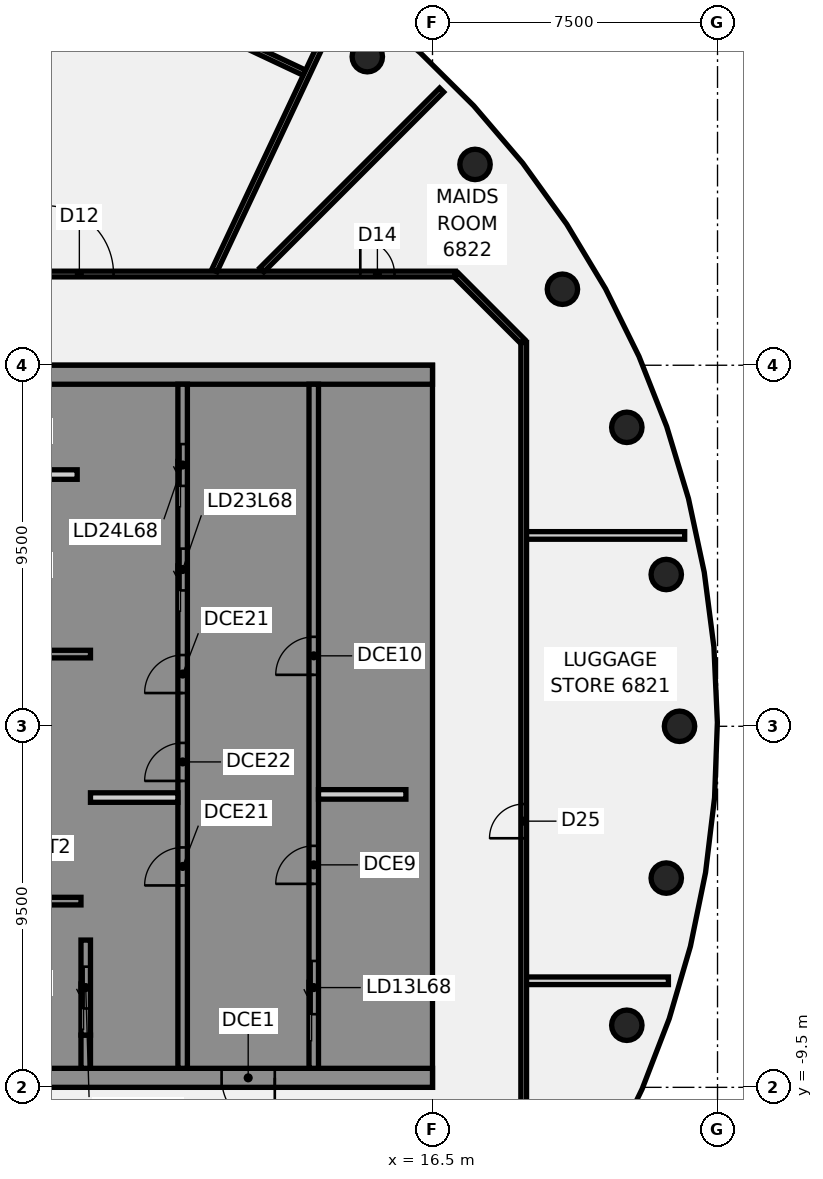
"""IFC4 building model, lengths in metres.
Left out: names, types, materials, properties, quantities, classifications, styles, units other than length and angle.
Written with IfcOpenShell. Run it as: python <this file> out.ifc"""

import sys

from ifc_helpers import new_model, si_unit, direction, frame, frame_2d, origin, origin_2d, place, context, subcontext, project, spatial, polyline, rectangle, circle, outline, extrude, element, fill, save


model = new_model("IFC4")
c1 = context("Model", 3, precision=1e-05, world=origin(), true_north=direction((0.0, 1.0)))
c2 = subcontext(c1, "Body", "Model", "MODEL_VIEW")
j1 = project(units=[si_unit("LENGTHUNIT", "METRE"), si_unit("PLANEANGLEUNIT", "RADIAN")], contexts=[c1])
p1 = place(None, origin())
s1 = spatial("IfcSite", under=j1, at=p1, CompositionType="ELEMENT")
p2 = place(p1, origin())
s2 = spatial("IfcBuilding", under=s1, at=p2, CompositionType="ELEMENT")
p3 = place(p2, frame((0.0, 0.0, 267.6)))
s3 = spatial("IfcBuildingStorey", under=s2, at=p3, CompositionType="ELEMENT", Elevation=267.6)
for number, where, z_axis, x_axis in (
    (1, (23.0, 0.0, -0.14), (0.0, 0.0, 1.0), (1.0, 0.0, 0.0)),
    (2, (22.651, 3.994, -0.14), (0.0, 0.0, 1.0), (1.0, 0.0, 0.0)),
    (3, (21.613, 7.866, -0.14), (0.0, 0.0, 1.0), (1.0, 0.0, 0.0)),
    (4, (19.919, 11.5, -0.14), (0.0, 0.0, 1.0), (1.0, 0.0, 0.0)),
    (5, (17.619, 14.784, -0.14), (0.0, 0.0, 1.0), (1.0, 0.0, 0.0)),
    (6, (14.784, 17.619, -0.14), (0.0, 0.0, 1.0), (1.0, 0.0, 0.0)),
    (7, (21.613, -7.866, -0.14), (0.0, 0.0, 1.0), (1.0, 0.0, 0.0)),
    (8, (22.651, -3.994, -0.14), (0.0, 0.0, 1.0), (1.0, 0.0, 0.0)),
):
    element("IfcColumn", number, at=place(p3, frame(where, z_axis=z_axis, x_axis=x_axis)), inside=s3, PredefinedType="COLUMN", context=c2, shape_type="SweptSolid", body=[
        extrude(circle(Radius=0.4, at=origin_2d()), origin(), (0.0, 0.0, 1.0), 3.6),
    ])
p4 = place(p3, frame((17.128, 11.872, 0.0), z_axis=(0.0, 0.0, 1.0), x_axis=(0.707106781187, -0.707106781187, 0.0)))
e9 = element("IfcWall", 9, at=p4, inside=s3, PredefinedType="PARTITIONING", context=c2, shape_type="SweptSolid", body=[
    extrude(rectangle(XDim=2.465, YDim=0.15, at=frame_2d((1.232, 0.0))), origin(), (0.0, 0.0, 1.0), 2.864),
])
p5 = place(p3, frame((0.337, 23.223, 0.0), z_axis=(0.0, 0.0, 1.0), x_axis=(0.904661349285, -0.426131251036, 0.0)))
e10 = element("IfcWall", 10, at=p5, inside=s3, PredefinedType="PARTITIONING", context=c2, shape_type="SweptSolid", body=[
    extrude(rectangle(XDim=14.141, YDim=0.15, at=frame_2d((7.07, 0.0))), origin(), (0.0, 0.0, 1.0), 2.864),
])
p6 = place(p5, frame((4.35, 0.0, 0.0)))
e11 = element("IfcOpeningElement", 11, at=p6, cuts=e10, PredefinedType="OPENING", context=c2, shape_type="SweptSolid", body=[
    extrude(rectangle(XDim=1.8, YDim=2.1, at=frame_2d((0.9, 1.05))), frame((0.0, 0.085, 0.0), z_axis=(0.0, -1.0, 0.0), x_axis=(1.0, 0.0, 0.0)), (0.0, 0.0, 1.0), 0.17),
])
p7 = place(p3, frame((-17.065, 11.9, 0.0), z_axis=(0.0, 0.0, 1.0), x_axis=(1.0, 0.0, 0.0)))
e12 = element("IfcWall", 12, at=p7, inside=s3, PredefinedType="PARTITIONING", context=c2, shape_type="SweptSolid", body=[
    extrude(rectangle(XDim=34.165, YDim=0.15, at=frame_2d((17.083, 0.0))), origin(), (0.0, 0.0, 1.0), 2.864),
])
p8 = place(p7, frame((23.372, 0.0, 0.0)))
e13 = element("IfcOpeningElement", 13, at=p8, cuts=e12, PredefinedType="OPENING", context=c2, shape_type="SweptSolid", body=[
    extrude(rectangle(XDim=1.8, YDim=2.1, at=frame_2d((0.9, 1.05))), frame((0.0, 0.085, 0.0), z_axis=(0.0, -1.0, 0.0), x_axis=(1.0, 0.0, 0.0)), (0.0, 0.0, 1.0), 0.17),
])
p9 = place(p7, frame((1.615, 0.0, 0.0)))
e14 = element("IfcOpeningElement", 14, at=p9, cuts=e12, PredefinedType="OPENING", context=c2, shape_type="SweptSolid", body=[
    extrude(rectangle(XDim=0.9, YDim=2.1, at=frame_2d((0.45, 1.05))), frame((0.0, 0.085, 0.0), z_axis=(0.0, -1.0, 0.0), x_axis=(1.0, 0.0, 0.0)), (0.0, 0.0, 1.0), 0.17),
])
p10 = place(p7, frame((31.665, 0.0, 0.0)))
e15 = element("IfcOpeningElement", 15, at=p10, cuts=e12, PredefinedType="OPENING", context=c2, shape_type="SweptSolid", body=[
    extrude(rectangle(XDim=0.9, YDim=2.1, at=frame_2d((0.45, 1.05))), frame((0.0, 0.085, 0.0), z_axis=(0.0, -1.0, 0.0), x_axis=(1.0, 0.0, 0.0)), (0.0, 0.0, 1.0), 0.17),
])
p11 = place(p7, frame((12.065, 0.0, 0.0)))
e16 = element("IfcOpeningElement", 16, at=p11, cuts=e12, PredefinedType="OPENING", context=c2, shape_type="SweptSolid", body=[
    extrude(rectangle(XDim=1.8, YDim=2.1, at=frame_2d((0.9, 1.05))), frame((0.0, 0.085, 0.0), z_axis=(0.0, -1.0, 0.0), x_axis=(1.0, 0.0, 0.0)), (0.0, 0.0, 1.0), 0.17),
])
p12 = place(p3, frame((18.955, -6.696, 0.0), z_axis=(0.0, 0.0, 1.0), x_axis=(1.0, 0.0, 0.0)))
e17 = element("IfcWall", 17, at=p12, inside=s3, PredefinedType="PARTITIONING", context=c2, shape_type="SweptSolid", body=[
    extrude(rectangle(XDim=3.753, YDim=0.2, at=frame_2d((1.876, 0.0))), origin(), (0.0, 0.0, 1.0), 2.864),
])
p13 = place(p3, frame((18.955, 5.022, 0.0), z_axis=(0.0, 0.0, 1.0), x_axis=(1.0, 0.0, 0.0)))
e18 = element("IfcWall", 18, at=p13, inside=s3, PredefinedType="PARTITIONING", context=c2, shape_type="SweptSolid", body=[
    extrude(rectangle(XDim=4.181, YDim=0.2, at=frame_2d((2.09, 0.0))), origin(), (0.0, 0.0, 1.0), 2.864),
])
p14 = place(p3, frame((12.01, 12.01, 0.0), z_axis=(0.0, 0.0, 1.0), x_axis=(0.707106781187, 0.707106781187, 0.0)))
e19 = element("IfcWall", 19, at=p14, inside=s3, PredefinedType="PARTITIONING", context=c2, shape_type="SweptSolid", body=[
    extrude(rectangle(XDim=6.691, YDim=0.15, at=frame_2d((3.345, 0.0))), origin(), (0.0, 0.0, 1.0), 2.864),
])
p15 = place(p3, frame((10.76, 11.99, 0.0), z_axis=(0.0, 0.0, 1.0), x_axis=(0.426145612642, 0.904654584262, 0.0)))
e20 = element("IfcWall", 20, at=p15, inside=s3, PredefinedType="PARTITIONING", context=c2, shape_type="SweptSolid", body=[
    extrude(rectangle(XDim=7.791, YDim=0.15, at=frame_2d((3.896, 0.0))), origin(), (0.0, 0.0, 1.0), 2.864),
])
p16 = place(p3, frame((18.9, -10.1, 0.0), z_axis=(0.0, 0.0, 1.0), x_axis=(0.0, 1.0, 0.0)))
e21 = element("IfcWall", 21, at=p16, inside=s3, PredefinedType="PARTITIONING", context=c2, shape_type="SweptSolid", body=[
    extrude(rectangle(XDim=20.2, YDim=0.15, at=frame_2d((10.1, 0.0))), origin(), (0.0, 0.0, 1.0), 2.864),
])
p17 = place(p16, frame((7.154, 0.0, 0.0)))
e22 = element("IfcOpeningElement", 22, at=p17, cuts=e21, PredefinedType="OPENING", context=c2, shape_type="SweptSolid", body=[
    extrude(rectangle(XDim=0.9, YDim=2.1, at=frame_2d((0.45, 1.05))), frame((0.0, 0.085, 0.0), z_axis=(0.0, -1.0, 0.0), x_axis=(1.0, 0.0, 0.0)), (0.0, 0.0, 1.0), 0.17),
])
p18 = place(p3, frame((16.5, -9.25, 0.0), z_axis=(0.0, 0.0, 1.0), x_axis=(-1.0, 0.0, 0.0)))
e23 = element("IfcWall", 23, at=p18, inside=s3, PredefinedType="SHEAR", context=c2, shape_type="SweptSolid", body=[
    extrude(rectangle(XDim=13.0, YDim=0.5, at=frame_2d((6.5, 0.0))), origin(), (0.0, 0.0, 1.0), 3.46),
])
p19 = place(p18, frame((4.15, 0.0, 0.0)))
e24 = element("IfcOpeningElement", 24, at=p19, cuts=e23, PredefinedType="OPENING", context=c2, shape_type="SweptSolid", body=[
    extrude(rectangle(XDim=1.4, YDim=2.1, at=frame_2d((0.7, 1.05))), frame((0.0, 0.26, 0.0), z_axis=(0.0, -1.0, 0.0), x_axis=(1.0, 0.0, 0.0)), (0.0, 0.0, 1.0), 0.52),
])
p20 = place(p18, frame((10.125, 0.0, 0.0)))
e25 = element("IfcOpeningElement", 25, at=p20, cuts=e23, PredefinedType="OPENING", context=c2, shape_type="SweptSolid", body=[
    extrude(rectangle(XDim=1.4, YDim=2.1, at=frame_2d((0.7, 1.05))), frame((0.0, 0.26, 0.0), z_axis=(0.0, -1.0, 0.0), x_axis=(1.0, 0.0, 0.0)), (0.0, 0.0, 1.0), 0.52),
])
p21 = place(p3, origin())
e26 = element("IfcWall", 26, at=p21, inside=s3, PredefinedType="SHEAR", context=c2, shape_type="SweptSolid", body=[
    extrude(outline(polyline([(13.5, -8.125), (13.5, -9.0), (16.0, -9.0), (16.5, -9.0), (16.5, 9.0), (16.0, 9.0), (13.5, 9.0), (13.5, 8.125), (16.0, 8.125), (16.0, 5.625), (13.5, 5.625), (13.5, 5.375), (16.0, 5.375), (16.0, -5.375), (13.5, -5.375), (13.5, -5.625), (16.0, -5.625), (16.0, -8.125), (13.5, -8.125)])), origin(), (0.0, 0.0, 1.0), 3.46),
])
p22 = place(p3, frame((16.5, 9.25, 0.0), z_axis=(0.0, 0.0, 1.0), x_axis=(-1.0, 0.0, 0.0)))
e27 = element("IfcWall", 27, at=p22, inside=s3, PredefinedType="SHEAR", context=c2, shape_type="SweptSolid", body=[
    extrude(rectangle(XDim=13.0, YDim=0.5, at=frame_2d((6.5, 0.0))), origin(), (0.0, 0.0, 1.0), 3.46),
])
p23 = place(p3, origin())
e28 = element("IfcWall", 28, at=p23, inside=s3, PredefinedType="SHEAR", context=c2, shape_type="SweptSolid", body=[
    extrude(outline(polyline([(9.8, -5.375), (7.5, -5.375), (7.5, 2.625), (9.8, 2.625), (9.8, 2.875), (7.5, 2.875), (7.5, 5.375), (9.8, 5.375), (9.8, 5.625), (7.5, 5.625), (7.5, 8.125), (9.8, 8.125), (9.8, 9.0), (7.5, 9.0), (7.25, 9.0), (7.25, -5.625), (7.5, -5.625), (9.8, -5.625), (9.8, -5.375)])), origin(), (0.0, 0.0, 1.0), 3.46),
])
p24 = place(p3, origin())
e29 = element("IfcWall", 29, at=p24, inside=s3, PredefinedType="SHEAR", context=c2, shape_type="SweptSolid", body=[
    extrude(outline(polyline([(7.5, -8.125), (7.5, -9.0), (9.8, -9.0), (9.8, -8.125), (9.8, -5.625), (9.55, -5.625), (9.55, -8.125), (7.5, -8.125)])), origin(), (0.0, 0.0, 1.0), 3.46),
])
p25 = place(p3, frame((7.375, -9.0, 0.0), z_axis=(0.0, 0.0, 1.0), x_axis=(0.0, 1.0, 0.0)))
e30 = element("IfcWall", 30, at=p25, inside=s3, PredefinedType="SHEAR", context=c2, shape_type="SweptSolid", body=[
    extrude(rectangle(XDim=0.875, YDim=0.25, at=frame_2d((0.438, 0.0))), origin(), (0.0, 0.0, 1.0), 3.46),
])
p26 = place(p3, frame((7.5, 1.9, 0.0), z_axis=(0.0, 0.0, 1.0), x_axis=(-1.0, 0.0, 0.0)))
e31 = element("IfcWall", 31, at=p26, inside=s3, PredefinedType="SHEAR", context=c2, shape_type="SweptSolid", body=[
    extrude(rectangle(XDim=3.3, YDim=0.2, at=frame_2d((1.65, 0.0))), origin(), (0.0, 0.0, 1.0), 3.46),
])
p27 = place(p3, frame((13.375, -9.0, 0.0), z_axis=(0.0, 0.0, 1.0), x_axis=(0.0, 1.0, 0.0)))
e32 = element("IfcWall", 32, at=p27, inside=s3, PredefinedType="SHEAR", context=c2, shape_type="SweptSolid", body=[
    extrude(rectangle(XDim=18.0, YDim=0.25, at=frame_2d((9.0, 0.0))), origin(), (0.0, 0.0, 1.0), 3.46),
])
p28 = place(p27, frame((1.425, 0.0, 0.0)))
e33 = element("IfcOpeningElement", 33, at=p28, cuts=e32, PredefinedType="OPENING", context=c2, shape_type="SweptSolid", body=[
    extrude(rectangle(XDim=1.4, YDim=2.1, at=frame_2d((0.7, 1.05))), frame((0.0, 0.135, 0.0), z_axis=(0.0, -1.0, 0.0), x_axis=(1.0, 0.0, 0.0)), (0.0, 0.0, 1.0), 0.27),
])
p29 = place(p27, frame((4.854, 0.0, 0.0)))
e34 = element("IfcOpeningElement", 34, at=p29, cuts=e32, PredefinedType="OPENING", context=c2, shape_type="SweptSolid", body=[
    extrude(rectangle(XDim=1.0, YDim=2.1, at=frame_2d((0.5, 1.05))), frame((0.0, 0.135, 0.0), z_axis=(0.0, -1.0, 0.0), x_axis=(1.0, 0.0, 0.0)), (0.0, 0.0, 1.0), 0.27),
])
p30 = place(p27, frame((10.354, 0.0, 0.0)))
e35 = element("IfcOpeningElement", 35, at=p30, cuts=e32, PredefinedType="OPENING", context=c2, shape_type="SweptSolid", body=[
    extrude(rectangle(XDim=1.0, YDim=2.1, at=frame_2d((0.5, 1.05))), frame((0.0, 0.135, 0.0), z_axis=(0.0, -1.0, 0.0), x_axis=(1.0, 0.0, 0.0)), (0.0, 0.0, 1.0), 0.27),
])
p31 = place(p3, frame((9.925, -9.0, 0.0), z_axis=(0.0, 0.0, 1.0), x_axis=(0.0, 1.0, 0.0)))
e36 = element("IfcWall", 36, at=p31, inside=s3, PredefinedType="SHEAR", context=c2, shape_type="SweptSolid", body=[
    extrude(rectangle(XDim=18.0, YDim=0.25, at=frame_2d((9.0, 0.0))), origin(), (0.0, 0.0, 1.0), 3.46),
])
p32 = place(p31, frame((12.575, 0.0, 0.0)))
e37 = element("IfcOpeningElement", 37, at=p32, cuts=e36, PredefinedType="OPENING", context=c2, shape_type="SweptSolid", body=[
    extrude(rectangle(XDim=1.1, YDim=2.1, at=frame_2d((0.55, 1.05))), frame((0.0, 0.135, 0.0), z_axis=(0.0, -1.0, 0.0), x_axis=(1.0, 0.0, 0.0)), (0.0, 0.0, 1.0), 0.27),
])
p33 = place(p31, frame((15.325, 0.0, 0.0)))
e38 = element("IfcOpeningElement", 38, at=p33, cuts=e36, PredefinedType="OPENING", context=c2, shape_type="SweptSolid", body=[
    extrude(rectangle(XDim=1.1, YDim=2.1, at=frame_2d((0.55, 1.05))), frame((0.0, 0.135, 0.0), z_axis=(0.0, -1.0, 0.0), x_axis=(1.0, 0.0, 0.0)), (0.0, 0.0, 1.0), 0.27),
])
p34 = place(p31, frame((4.812, 0.0, 0.0)))
e39 = element("IfcOpeningElement", 39, at=p34, cuts=e36, PredefinedType="OPENING", context=c2, shape_type="SweptSolid", body=[
    extrude(rectangle(XDim=1.0, YDim=2.1, at=frame_2d((0.5, 1.05))), frame((0.0, 0.135, 0.0), z_axis=(0.0, -1.0, 0.0), x_axis=(1.0, 0.0, 0.0)), (0.0, 0.0, 1.0), 0.27),
])
p35 = place(p31, frame((7.562, 0.0, 0.0)))
e40 = element("IfcOpeningElement", 40, at=p35, cuts=e36, PredefinedType="OPENING", context=c2, shape_type="SweptSolid", body=[
    extrude(rectangle(XDim=1.0, YDim=2.1, at=frame_2d((0.5, 1.05))), frame((0.0, 0.135, 0.0), z_axis=(0.0, -1.0, 0.0), x_axis=(1.0, 0.0, 0.0)), (0.0, 0.0, 1.0), 0.27),
])
p36 = place(p31, frame((9.875, 0.0, 0.0)))
e41 = element("IfcOpeningElement", 41, at=p36, cuts=e36, PredefinedType="OPENING", context=c2, shape_type="SweptSolid", body=[
    extrude(rectangle(XDim=1.0, YDim=2.1, at=frame_2d((0.5, 1.05))), frame((0.0, 0.135, 0.0), z_axis=(0.0, -1.0, 0.0), x_axis=(1.0, 0.0, 0.0)), (0.0, 0.0, 1.0), 0.27),
])
p37 = place(p3, frame((7.375, -8.125, 0.0), z_axis=(0.0, 0.0, 1.0), x_axis=(0.0, 1.0, 0.0)))
e42 = element("IfcWall", 42, at=p37, inside=s3, PredefinedType="SHEAR", context=c2, shape_type="SweptSolid", body=[
    extrude(rectangle(XDim=2.5, YDim=0.25, at=frame_2d((1.25, 0.0))), origin(), (0.0, 0.0, 1.0), 3.46),
])
p38 = place(p37, frame((0.7, 0.0, 0.0)))
e43 = element("IfcOpeningElement", 43, at=p38, cuts=e42, PredefinedType="OPENING", context=c2, shape_type="SweptSolid", body=[
    extrude(rectangle(XDim=1.1, YDim=2.1, at=frame_2d((0.55, 1.05))), frame((0.0, 0.135, 0.0), z_axis=(0.0, -1.0, 0.0), x_axis=(1.0, 0.0, 0.0)), (0.0, 0.0, 1.0), 0.27),
])
p39 = place(p3, frame((7.15, 6.624, 0.0), z_axis=(0.0, 0.0, 1.0), x_axis=(-1.0, 0.0, 0.0)))
e44 = element("IfcWall", 44, at=p39, inside=s3, PredefinedType="PARTITIONING", context=c2, shape_type="SweptSolid", body=[
    extrude(rectangle(XDim=2.95, YDim=0.25, at=frame_2d((1.475, 0.0))), origin(), (0.0, 0.0, 1.0), 3.46),
])
p40 = place(p3, frame((7.25, -4.6, 0.0), z_axis=(0.0, 0.0, 1.0), x_axis=(-1.0, 0.0, 0.0)))
e45 = element("IfcWall", 45, at=p40, inside=s3, PredefinedType="SHEAR", context=c2, shape_type="SweptSolid", body=[
    extrude(rectangle(XDim=3.25, YDim=0.2, at=frame_2d((1.625, 0.0))), origin(), (0.0, 0.0, 1.0), 3.46),
])
p41 = place(p40, frame((1.025, 0.0, 0.0)))
e46 = element("IfcOpeningElement", 46, at=p41, cuts=e45, PredefinedType="OPENING", context=c2, shape_type="SweptSolid", body=[
    extrude(rectangle(XDim=1.1, YDim=2.1, at=frame_2d((0.55, 1.05))), frame((0.0, 0.11, 0.0), z_axis=(0.0, -1.0, 0.0), x_axis=(1.0, 0.0, 0.0)), (0.0, 0.0, 1.0), 0.22),
])
for number, where, z_axis, x_axis in (
    (47, (15.8, -1.792, 0.0), (0.0, 0.0, 1.0), (-1.0, 0.0, 0.0)),
    (48, (9.8, -1.875, 0.0), (0.0, 0.0, 1.0), (-1.0, 0.0, 0.0)),
):
    element("IfcWall", number, at=place(p3, frame(where, z_axis=z_axis, x_axis=x_axis)), inside=s3, PredefinedType="PARTITIONING", context=c2, shape_type="SweptSolid", body=[
        extrude(rectangle(XDim=2.3, YDim=0.25, at=frame_2d((1.15, 0.0))), origin(), (0.0, 0.0, 1.0), 3.46),
    ])
p42 = place(p8, frame((1.8, 0.0, 0.0), z_axis=(0.0, 0.0, 1.0), x_axis=(-1.0, 0.0, 0.0)))
e49 = element("IfcDoor", 49, at=p42, inside=s3, OperationType="DOUBLE_DOOR_SINGLE_SWING", PredefinedType="DOOR", context=c2, shape_type="SweptSolid", body=[
    extrude(rectangle(XDim=1.8, YDim=2.1, at=frame_2d((0.9, 1.05))), frame((0.0, 0.025, 0.0), z_axis=(0.0, -1.0, 0.0), x_axis=(1.0, 0.0, 0.0)), (0.0, 0.0, 1.0), 0.05),
])
fill(e13, e49)
p43 = place(p10, origin())
e50 = element("IfcDoor", 50, at=p43, inside=s3, OperationType="SINGLE_SWING_LEFT", PredefinedType="DOOR", context=c2, shape_type="SweptSolid", body=[
    extrude(rectangle(XDim=0.9, YDim=2.1, at=frame_2d((0.45, 1.05))), frame((0.0, 0.025, 0.0), z_axis=(0.0, -1.0, 0.0), x_axis=(1.0, 0.0, 0.0)), (0.0, 0.0, 1.0), 0.05),
])
fill(e15, e50)
p44 = place(p17, frame((0.9, 0.0, 0.0), z_axis=(0.0, 0.0, 1.0), x_axis=(-1.0, 0.0, 0.0)))
e51 = element("IfcDoor", 51, at=p44, inside=s3, OperationType="SINGLE_SWING_LEFT", PredefinedType="DOOR", context=c2, shape_type="SweptSolid", body=[
    extrude(rectangle(XDim=0.9, YDim=2.1, at=frame_2d((0.45, 1.05))), frame((0.0, 0.025, 0.0), z_axis=(0.0, -1.0, 0.0), x_axis=(1.0, 0.0, 0.0)), (0.0, 0.0, 1.0), 0.05),
])
fill(e22, e51)
p45 = place(p19, origin())
e52 = element("IfcDoor", 52, at=p45, inside=s3, OperationType="SINGLE_SWING_LEFT", PredefinedType="DOOR", context=c2, shape_type="SweptSolid", body=[
    extrude(rectangle(XDim=1.4, YDim=2.1, at=frame_2d((0.7, 1.05))), frame((0.0, 0.025, 0.0), z_axis=(0.0, -1.0, 0.0), x_axis=(1.0, 0.0, 0.0)), (0.0, 0.0, 1.0), 0.05),
])
fill(e24, e52)
p46 = place(p28, origin())
e53 = element("IfcDoor", 53, at=p46, inside=s3, OperationType="SLIDING_TO_LEFT", PredefinedType="DOOR", context=c2, shape_type="SweptSolid", body=[
    extrude(rectangle(XDim=1.4, YDim=2.1, at=frame_2d((0.7, 1.05))), frame((0.0, 0.025, 0.0), z_axis=(0.0, -1.0, 0.0), x_axis=(1.0, 0.0, 0.0)), (0.0, 0.0, 1.0), 0.05),
])
fill(e33, e53)
p47 = place(p38, origin())
e54 = element("IfcDoor", 54, at=p47, inside=s3, OperationType="SLIDING_TO_LEFT", PredefinedType="DOOR", context=c2, shape_type="SweptSolid", body=[
    extrude(rectangle(XDim=1.1, YDim=2.1, at=frame_2d((0.55, 1.05))), frame((0.0, 0.025, 0.0), z_axis=(0.0, -1.0, 0.0), x_axis=(1.0, 0.0, 0.0)), (0.0, 0.0, 1.0), 0.05),
])
fill(e43, e54)
p48 = place(p32, origin())
e55 = element("IfcDoor", 55, at=p48, inside=s3, OperationType="SLIDING_TO_LEFT", PredefinedType="DOOR", context=c2, shape_type="SweptSolid", body=[
    extrude(rectangle(XDim=1.1, YDim=2.1, at=frame_2d((0.55, 1.05))), frame((0.0, 0.025, 0.0), z_axis=(0.0, -1.0, 0.0), x_axis=(1.0, 0.0, 0.0)), (0.0, 0.0, 1.0), 0.05),
])
fill(e37, e55)
p49 = place(p33, origin())
e56 = element("IfcDoor", 56, at=p49, inside=s3, OperationType="SLIDING_TO_LEFT", PredefinedType="DOOR", context=c2, shape_type="SweptSolid", body=[
    extrude(rectangle(XDim=1.1, YDim=2.1, at=frame_2d((0.55, 1.05))), frame((0.0, 0.025, 0.0), z_axis=(0.0, -1.0, 0.0), x_axis=(1.0, 0.0, 0.0)), (0.0, 0.0, 1.0), 0.05),
])
fill(e38, e56)
p50 = place(p29, origin())
e57 = element("IfcDoor", 57, at=p50, inside=s3, OperationType="SINGLE_SWING_LEFT", PredefinedType="DOOR", context=c2, shape_type="SweptSolid", body=[
    extrude(rectangle(XDim=1.0, YDim=2.1, at=frame_2d((0.5, 1.05))), frame((0.0, 0.025, 0.0), z_axis=(0.0, -1.0, 0.0), x_axis=(1.0, 0.0, 0.0)), (0.0, 0.0, 1.0), 0.05),
])
fill(e34, e57)
p51 = place(p30, origin())
e58 = element("IfcDoor", 58, at=p51, inside=s3, OperationType="SINGLE_SWING_LEFT", PredefinedType="DOOR", context=c2, shape_type="SweptSolid", body=[
    extrude(rectangle(XDim=1.0, YDim=2.1, at=frame_2d((0.5, 1.05))), frame((0.0, 0.025, 0.0), z_axis=(0.0, -1.0, 0.0), x_axis=(1.0, 0.0, 0.0)), (0.0, 0.0, 1.0), 0.05),
])
fill(e35, e58)
p52 = place(p34, origin())
e59 = element("IfcDoor", 59, at=p52, inside=s3, OperationType="SINGLE_SWING_LEFT", PredefinedType="DOOR", context=c2, shape_type="SweptSolid", body=[
    extrude(rectangle(XDim=1.0, YDim=2.1, at=frame_2d((0.5, 1.05))), frame((0.0, 0.025, 0.0), z_axis=(0.0, -1.0, 0.0), x_axis=(1.0, 0.0, 0.0)), (0.0, 0.0, 1.0), 0.05),
])
fill(e39, e59)
p53 = place(p35, origin())
e60 = element("IfcDoor", 60, at=p53, inside=s3, OperationType="SINGLE_SWING_LEFT", PredefinedType="DOOR", context=c2, shape_type="SweptSolid", body=[
    extrude(rectangle(XDim=1.0, YDim=2.1, at=frame_2d((0.5, 1.05))), frame((0.0, 0.025, 0.0), z_axis=(0.0, -1.0, 0.0), x_axis=(1.0, 0.0, 0.0)), (0.0, 0.0, 1.0), 0.05),
])
fill(e40, e60)
p54 = place(p36, origin())
e61 = element("IfcDoor", 61, at=p54, inside=s3, OperationType="SINGLE_SWING_LEFT", PredefinedType="DOOR", context=c2, shape_type="SweptSolid", body=[
    extrude(rectangle(XDim=1.0, YDim=2.1, at=frame_2d((0.5, 1.05))), frame((0.0, 0.025, 0.0), z_axis=(0.0, -1.0, 0.0), x_axis=(1.0, 0.0, 0.0)), (0.0, 0.0, 1.0), 0.05),
])
fill(e41, e61)
save(model, sys.argv[1])
